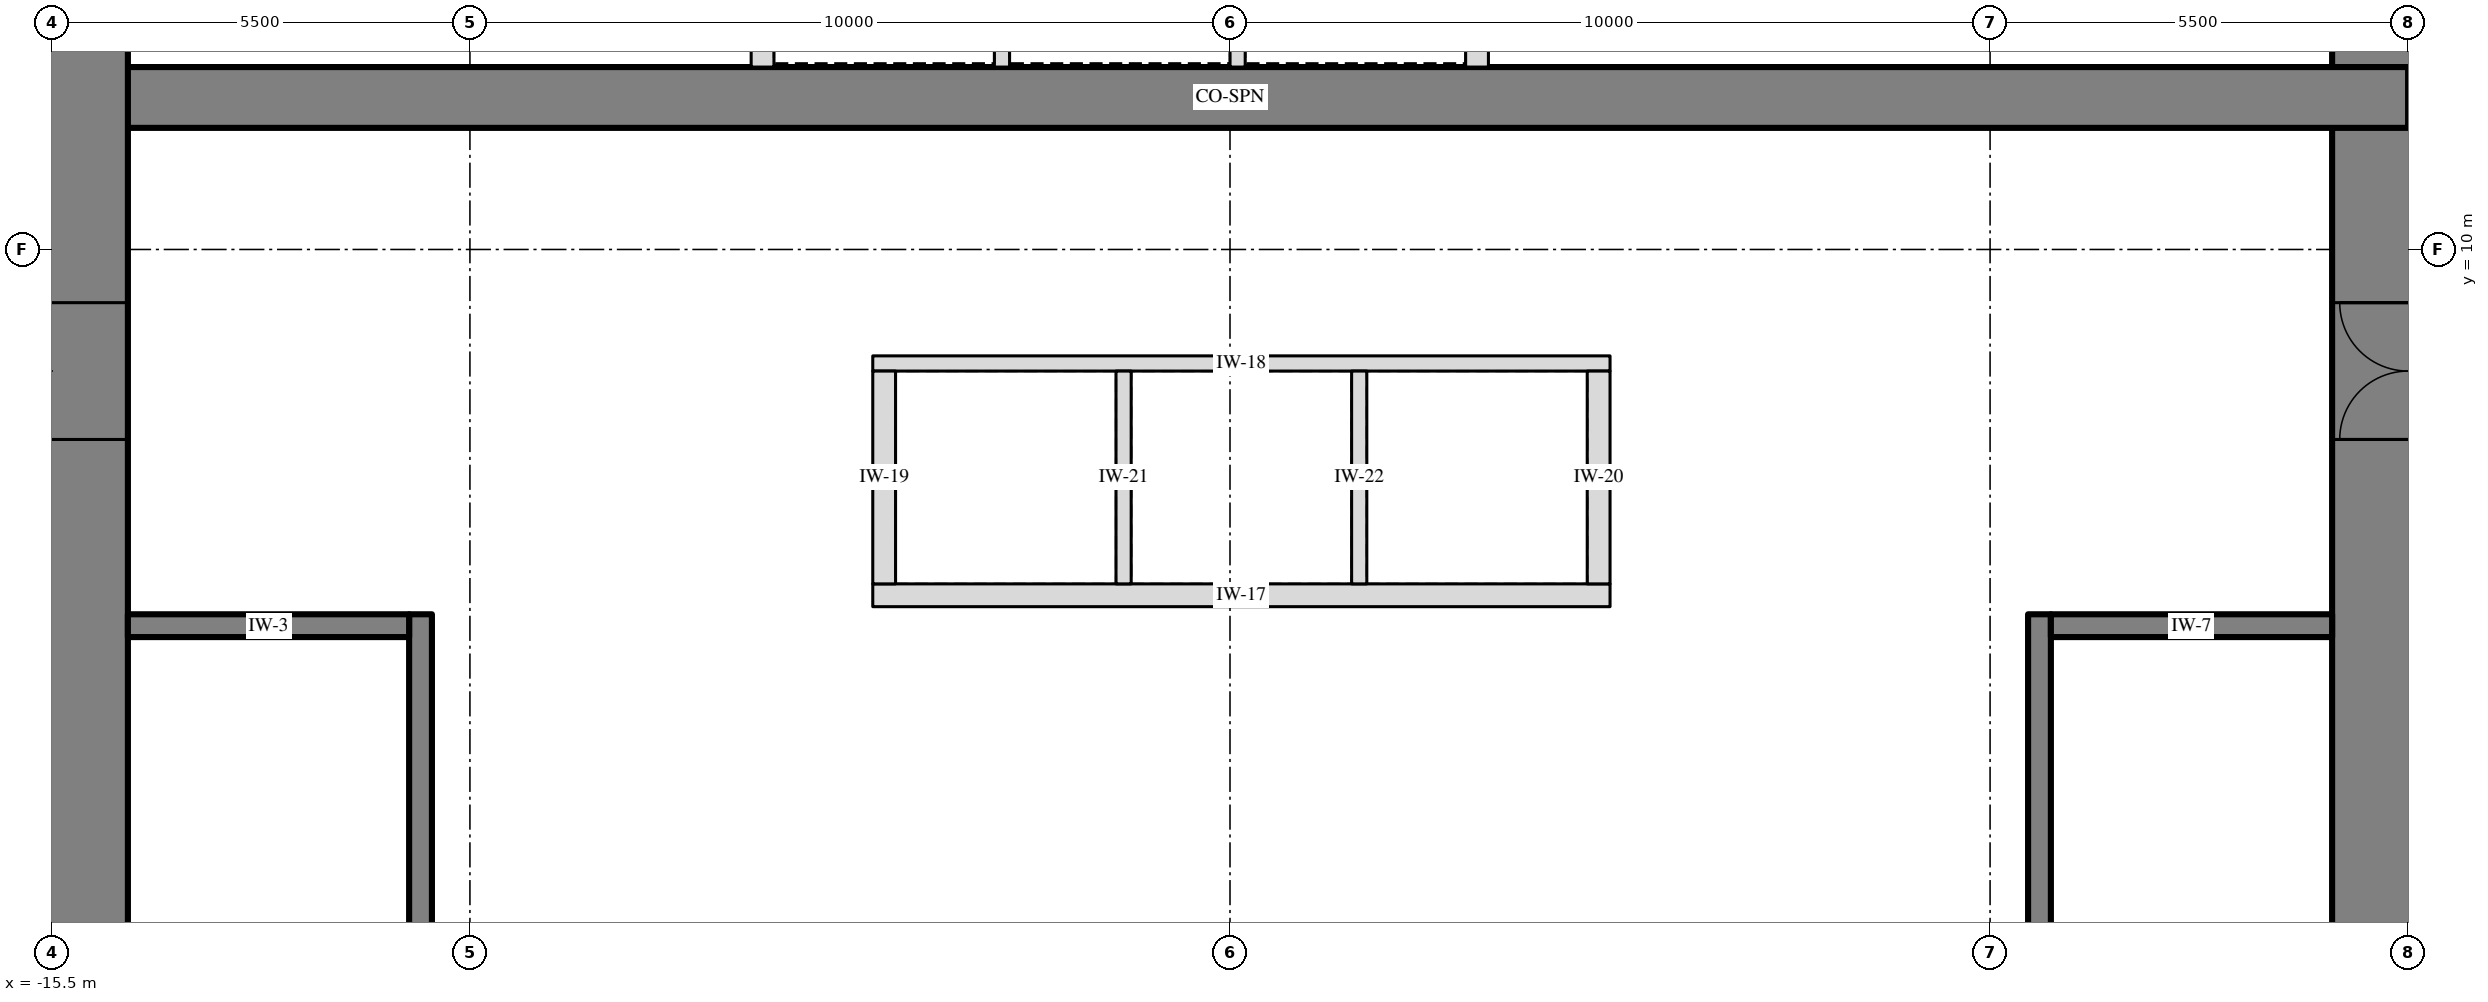
"""IFC4 building model, lengths in metres.
Left out: names, types, materials, properties, quantities, classifications, styles, units other than length and angle.
Written with IfcOpenShell. Run it as: python <this file> out.ifc"""

import sys

from ifc_helpers import new_model, si_unit, direction, frame, frame_2d, origin, place, context, subcontext, project, spatial, rectangle, extrude, element, fill, save


model = new_model("IFC4")
c1 = context("Model", 3, precision=1e-05, world=origin(), true_north=direction((0.0, 1.0)))
c2 = subcontext(c1, "Body", "Model", "MODEL_VIEW")
j1 = project(units=[si_unit("LENGTHUNIT", "METRE"), si_unit("PLANEANGLEUNIT", "RADIAN")], contexts=[c1])
p1 = place(None, origin())
s1 = spatial("IfcSite", under=j1, at=p1, CompositionType="ELEMENT")
p2 = place(p1, origin())
s2 = spatial("IfcBuilding", under=s1, at=p2, CompositionType="ELEMENT")
p3 = place(p2, frame((0.0, 0.0, 21.0)))
s3 = spatial("IfcBuildingStorey", under=s2, at=p3, CompositionType="ELEMENT", Elevation=21.0)
p4 = place(p3, frame((15.5, -15.5, -0.25), z_axis=(0.0, 0.0, 1.0), x_axis=(0.0, 1.0, 0.0)))
e1 = element("IfcWall", 1, at=p4, inside=s3, PredefinedType="SHEAR", context=c2, shape_type="SweptSolid", body=[
    extrude(rectangle(XDim=31.0, YDim=2.0, at=frame_2d((15.5, 0.0))), origin(), (0.0, 0.0, 1.0), 3.75),
])
p5 = place(p4, frame((6.5, 0.0, 0.25)))
e2 = element("IfcOpeningElement", 2, at=p5, cuts=e1, PredefinedType="OPENING", context=c2, shape_type="SweptSolid", body=[
    extrude(rectangle(XDim=1.2, YDim=2.1, at=frame_2d((0.6, 1.05))), frame((0.0, 1.01, 0.0), z_axis=(0.0, -1.0, 0.0), x_axis=(1.0, 0.0, 0.0)), (0.0, 0.0, 1.0), 2.02),
])
p6 = place(p4, frame((23.0, 0.0, 0.25)))
e3 = element("IfcOpeningElement", 3, at=p6, cuts=e1, PredefinedType="OPENING", context=c2, shape_type="SweptSolid", body=[
    extrude(rectangle(XDim=1.8, YDim=2.1, at=frame_2d((0.9, 1.05))), frame((0.0, 1.01, 0.0), z_axis=(0.0, -1.0, 0.0), x_axis=(1.0, 0.0, 0.0)), (0.0, 0.0, 1.0), 2.02),
])
p7 = place(p3, frame((-15.5, 12.0, -0.25), z_axis=(0.0, 0.0, 1.0), x_axis=(1.0, 0.0, 0.0)))
e4 = element("IfcWall", 4, at=p7, inside=s3, PredefinedType="SHEAR", context=c2, shape_type="SweptSolid", body=[
    extrude(rectangle(XDim=31.0, YDim=0.8, at=frame_2d((15.5, 0.0))), origin(), (0.0, 0.0, 1.0), 3.75),
])
p8 = place(p3, frame((-15.5, -15.5, -0.25), z_axis=(0.0, 0.0, 1.0), x_axis=(0.0, 1.0, 0.0)))
e5 = element("IfcWall", 5, at=p8, inside=s3, PredefinedType="SHEAR", context=c2, shape_type="SweptSolid", body=[
    extrude(rectangle(XDim=31.0, YDim=2.0, at=frame_2d((15.5, 0.0))), origin(), (0.0, 0.0, 1.0), 3.75),
])
p9 = place(p8, frame((6.5, 0.0, 0.25)))
e6 = element("IfcOpeningElement", 6, at=p9, cuts=e5, PredefinedType="OPENING", context=c2, shape_type="SweptSolid", body=[
    extrude(rectangle(XDim=1.2, YDim=2.1, at=frame_2d((0.6, 1.05))), frame((0.0, 1.01, 0.0), z_axis=(0.0, -1.0, 0.0), x_axis=(1.0, 0.0, 0.0)), (0.0, 0.0, 1.0), 2.02),
])
p10 = place(p8, frame((23.0, 0.0, 0.25)))
e7 = element("IfcOpeningElement", 7, at=p10, cuts=e5, PredefinedType="OPENING", context=c2, shape_type="SweptSolid", body=[
    extrude(rectangle(XDim=1.8, YDim=2.1, at=frame_2d((0.9, 1.05))), frame((0.0, 1.01, 0.0), z_axis=(0.0, -1.0, 0.0), x_axis=(1.0, 0.0, 0.0)), (0.0, 0.0, 1.0), 2.02),
])
p11 = place(p3, frame((-10.65, -4.9, 0.0), z_axis=(0.0, 0.0, 1.0), x_axis=(0.0, 1.0, 0.0)))
e8 = element("IfcWall", 8, at=p11, inside=s3, PredefinedType="SOLIDWALL", context=c2, shape_type="SweptSolid", body=[
    extrude(rectangle(XDim=10.1, YDim=0.3, at=frame_2d((5.05, 0.0))), origin(), (0.0, 0.0, 1.0), 3.5),
])
p12 = place(p3, frame((-14.5, 5.05, 0.0), z_axis=(0.0, 0.0, 1.0), x_axis=(1.0, 0.0, 0.0)))
e9 = element("IfcWall", 9, at=p12, inside=s3, PredefinedType="SOLIDWALL", context=c2, shape_type="SweptSolid", body=[
    extrude(rectangle(XDim=3.7, YDim=0.3, at=frame_2d((1.85, 0.0))), origin(), (0.0, 0.0, 1.0), 3.5),
])
p13 = place(p3, frame((10.65, -4.9, 0.0), z_axis=(0.0, 0.0, 1.0), x_axis=(0.0, 1.0, 0.0)))
e10 = element("IfcWall", 10, at=p13, inside=s3, PredefinedType="SOLIDWALL", context=c2, shape_type="SweptSolid", body=[
    extrude(rectangle(XDim=10.1, YDim=0.3, at=frame_2d((5.05, 0.0))), origin(), (0.0, 0.0, 1.0), 3.5),
])
p14 = place(p3, frame((14.5, 5.05, 0.0), z_axis=(0.0, 0.0, 1.0), x_axis=(-1.0, 0.0, 0.0)))
e11 = element("IfcWall", 11, at=p14, inside=s3, PredefinedType="SOLIDWALL", context=c2, shape_type="SweptSolid", body=[
    extrude(rectangle(XDim=3.7, YDim=0.3, at=frame_2d((1.85, 0.0))), origin(), (0.0, 0.0, 1.0), 3.5),
])
p15 = place(p3, frame((-4.7, 5.45, 0.0), z_axis=(0.0, 0.0, 1.0), x_axis=(1.0, 0.0, 0.0)))
e12 = element("IfcWall", 12, at=p15, inside=s3, PredefinedType="PARTITIONING", context=c2, shape_type="SweptSolid", body=[
    extrude(rectangle(XDim=9.7, YDim=0.3, at=frame_2d((4.85, 0.0))), origin(), (0.0, 0.0, 1.0), 3.5),
])
p16 = place(p3, frame((-4.7, 8.5, 0.0), z_axis=(0.0, 0.0, 1.0), x_axis=(1.0, 0.0, 0.0)))
e13 = element("IfcWall", 13, at=p16, inside=s3, PredefinedType="PARTITIONING", context=c2, shape_type="SweptSolid", body=[
    extrude(rectangle(XDim=9.7, YDim=0.2, at=frame_2d((4.85, 0.0))), origin(), (0.0, 0.0, 1.0), 3.5),
])
for number, where, z_axis, x_axis in (
    (14, (-4.55, 5.6, 0.0), (0.0, 0.0, 1.0), (0.0, 1.0, 0.0)),
    (15, (4.85, 5.6, 0.0), (0.0, 0.0, 1.0), (0.0, 1.0, 0.0)),
):
    element("IfcWall", number, at=place(p3, frame(where, z_axis=z_axis, x_axis=x_axis)), inside=s3, PredefinedType="PARTITIONING", context=c2, shape_type="SweptSolid", body=[
        extrude(rectangle(XDim=2.8, YDim=0.3, at=frame_2d((1.4, 0.0))), origin(), (0.0, 0.0, 1.0), 3.5),
    ])
for number, where, z_axis, x_axis in (
    (16, (-1.4, 5.6, 0.0), (0.0, 0.0, 1.0), (0.0, 1.0, 0.0)),
    (17, (1.7, 5.6, 0.0), (0.0, 0.0, 1.0), (0.0, 1.0, 0.0)),
):
    element("IfcWall", number, at=place(p3, frame(where, z_axis=z_axis, x_axis=x_axis)), inside=s3, PredefinedType="PARTITIONING", context=c2, shape_type="SweptSolid", body=[
        extrude(rectangle(XDim=2.8, YDim=0.2, at=frame_2d((1.4, 0.0))), origin(), (0.0, 0.0, 1.0), 3.5),
    ])
for number, where, z_axis, x_axis in (
    (18, (-6.15, 12.4, 0.0), (0.0, 0.0, 1.0), (0.0, 1.0, 0.0)),
    (19, (3.25, 12.4, 0.0), (0.0, 0.0, 1.0), (0.0, 1.0, 0.0)),
):
    element("IfcWall", number, at=place(p3, frame(where, z_axis=z_axis, x_axis=x_axis)), inside=s3, PredefinedType="PARTITIONING", context=c2, shape_type="SweptSolid", body=[
        extrude(rectangle(XDim=2.1, YDim=0.3, at=frame_2d((1.05, 0.0))), origin(), (0.0, 0.0, 1.0), 3.5),
    ])
for number, where, z_axis, x_axis in (
    (20, (-3.0, 12.4, 0.0), (0.0, 0.0, 1.0), (0.0, 1.0, 0.0)),
    (21, (0.1, 12.4, 0.0), (0.0, 0.0, 1.0), (0.0, 1.0, 0.0)),
):
    element("IfcWall", number, at=place(p3, frame(where, z_axis=z_axis, x_axis=x_axis)), inside=s3, PredefinedType="PARTITIONING", context=c2, shape_type="SweptSolid", body=[
        extrude(rectangle(XDim=2.1, YDim=0.2, at=frame_2d((1.05, 0.0))), origin(), (0.0, 0.0, 1.0), 3.5),
    ])
p17 = place(p3, frame((-10.65, 2.0, 0.0), z_axis=(0.0, 0.0, 1.0), x_axis=(1.0, 0.0, 0.0)))
e22 = element("IfcWall", 22, at=p17, inside=s3, PredefinedType="PARTITIONING", context=c2, shape_type="SweptSolid", body=[
    extrude(rectangle(XDim=21.3, YDim=0.3, at=frame_2d((10.65, 0.0))), origin(), (0.0, 0.0, 1.0), 3.5),
])
p18 = place(p17, frame((10.05, 0.0, 0.0)))
e23 = element("IfcOpeningElement", 23, at=p18, cuts=e22, PredefinedType="OPENING", context=c2, shape_type="SweptSolid", body=[
    extrude(rectangle(XDim=1.2, YDim=2.1, at=frame_2d((0.6, 1.05))), frame((0.0, 0.16, 0.0), z_axis=(0.0, -1.0, 0.0), x_axis=(1.0, 0.0, 0.0)), (0.0, 0.0, 1.0), 0.32),
])
p19 = place(p17, frame((18.942, 0.0, 0.0)))
e24 = element("IfcOpeningElement", 24, at=p19, cuts=e22, PredefinedType="OPENING", context=c2, shape_type="SweptSolid", body=[
    extrude(rectangle(XDim=0.9, YDim=2.1, at=frame_2d((0.45, 1.05))), frame((0.0, 0.16, 0.0), z_axis=(0.0, -1.0, 0.0), x_axis=(1.0, 0.0, 0.0)), (0.0, 0.0, 1.0), 0.32),
])
p20 = place(p3, frame((-3.3, -6.65, 0.0), z_axis=(0.0, 0.0, 1.0), x_axis=(0.0, 1.0, 0.0)))
e25 = element("IfcWall", 25, at=p20, inside=s3, PredefinedType="PARTITIONING", context=c2, shape_type="SweptSolid", body=[
    extrude(rectangle(XDim=8.65, YDim=0.3, at=frame_2d((4.325, 0.0))), origin(), (0.0, 0.0, 1.0), 3.5),
])
p21 = place(p20, frame((1.75, 0.0, 0.0)))
e26 = element("IfcOpeningElement", 26, at=p21, cuts=e25, PredefinedType="OPENING", context=c2, shape_type="SweptSolid", body=[
    extrude(rectangle(XDim=0.9, YDim=2.1, at=frame_2d((0.45, 1.05))), frame((0.0, 0.16, 0.0), z_axis=(0.0, -1.0, 0.0), x_axis=(1.0, 0.0, 0.0)), (0.0, 0.0, 1.0), 0.32),
])
p22 = place(p20, frame((6.075, 0.0, 0.0)))
e27 = element("IfcOpeningElement", 27, at=p22, cuts=e25, PredefinedType="OPENING", context=c2, shape_type="SweptSolid", body=[
    extrude(rectangle(XDim=0.9, YDim=2.1, at=frame_2d((0.45, 1.05))), frame((0.0, 0.16, 0.0), z_axis=(0.0, -1.0, 0.0), x_axis=(1.0, 0.0, 0.0)), (0.0, 0.0, 1.0), 0.32),
])
p23 = place(p3, frame((3.3, -6.65, 0.0), z_axis=(0.0, 0.0, 1.0), x_axis=(0.0, 1.0, 0.0)))
e28 = element("IfcWall", 28, at=p23, inside=s3, PredefinedType="PARTITIONING", context=c2, shape_type="SweptSolid", body=[
    extrude(rectangle(XDim=8.65, YDim=0.3, at=frame_2d((4.325, 0.0))), origin(), (0.0, 0.0, 1.0), 3.5),
])
p24 = place(p23, frame((3.875, 0.0, 0.0)))
e29 = element("IfcOpeningElement", 29, at=p24, cuts=e28, PredefinedType="OPENING", context=c2, shape_type="SweptSolid", body=[
    extrude(rectangle(XDim=0.9, YDim=2.1, at=frame_2d((0.45, 1.05))), frame((0.0, 0.16, 0.0), z_axis=(0.0, -1.0, 0.0), x_axis=(1.0, 0.0, 0.0)), (0.0, 0.0, 1.0), 0.32),
])
p25 = place(p3, frame((6.834, -6.65, 0.0), z_axis=(0.0, 0.0, 1.0), x_axis=(0.0, 1.0, 0.0)))
e30 = element("IfcWall", 30, at=p25, inside=s3, PredefinedType="PARTITIONING", context=c2, shape_type="SweptSolid", body=[
    extrude(rectangle(XDim=8.65, YDim=0.3, at=frame_2d((4.325, 0.0))), origin(), (0.0, 0.0, 1.0), 3.5),
])
p26 = place(p3, frame((-4.85, 5.3, 0.0), z_axis=(0.0, 0.0, 1.0), x_axis=(0.0, 1.0, 0.0)))
e31 = element("IfcWall", 31, at=p26, inside=s3, PredefinedType="PARTITIONING", context=c2, shape_type="SweptSolid", body=[
    extrude(rectangle(XDim=6.3, YDim=0.3, at=frame_2d((3.15, 0.0))), origin(), (0.0, 0.0, 1.0), 3.5),
])
p27 = place(p26, frame((4.35, 0.0, 0.0)))
e32 = element("IfcOpeningElement", 32, at=p27, cuts=e31, PredefinedType="OPENING", context=c2, shape_type="SweptSolid", body=[
    extrude(rectangle(XDim=0.9, YDim=2.1, at=frame_2d((0.45, 1.05))), frame((0.0, 0.16, 0.0), z_axis=(0.0, -1.0, 0.0), x_axis=(1.0, 0.0, 0.0)), (0.0, 0.0, 1.0), 0.32),
])
p28 = place(p3, frame((5.15, 5.3, 0.0), z_axis=(0.0, 0.0, 1.0), x_axis=(0.0, 1.0, 0.0)))
e33 = element("IfcWall", 33, at=p28, inside=s3, PredefinedType="PARTITIONING", context=c2, shape_type="SweptSolid", body=[
    extrude(rectangle(XDim=6.3, YDim=0.3, at=frame_2d((3.15, 0.0))), origin(), (0.0, 0.0, 1.0), 3.5),
])
p29 = place(p10, origin())
e34 = element("IfcDoor", 34, at=p29, inside=s3, OperationType="DOUBLE_DOOR_SINGLE_SWING", PredefinedType="DOOR", context=c2, shape_type="SweptSolid", body=[
    extrude(rectangle(XDim=1.8, YDim=2.1, at=frame_2d((0.9, 1.05))), frame((0.0, 0.025, 0.0), z_axis=(0.0, -1.0, 0.0), x_axis=(1.0, 0.0, 0.0)), (0.0, 0.0, 1.0), 0.05),
])
fill(e7, e34)
p30 = place(p6, origin())
e35 = element("IfcDoor", 35, at=p30, inside=s3, OperationType="DOUBLE_DOOR_SINGLE_SWING", PredefinedType="DOOR", context=c2, shape_type="SweptSolid", body=[
    extrude(rectangle(XDim=1.8, YDim=2.1, at=frame_2d((0.9, 1.05))), frame((0.0, 0.025, 0.0), z_axis=(0.0, -1.0, 0.0), x_axis=(1.0, 0.0, 0.0)), (0.0, 0.0, 1.0), 0.05),
])
fill(e3, e35)
p31 = place(p18, origin())
e36 = element("IfcDoor", 36, at=p31, inside=s3, OperationType="SINGLE_SWING_LEFT", PredefinedType="DOOR", context=c2, shape_type="SweptSolid", body=[
    extrude(rectangle(XDim=1.2, YDim=2.1, at=frame_2d((0.6, 1.05))), frame((0.0, 0.025, 0.0), z_axis=(0.0, -1.0, 0.0), x_axis=(1.0, 0.0, 0.0)), (0.0, 0.0, 1.0), 0.05),
])
fill(e23, e36)
p32 = place(p19, origin())
e37 = element("IfcDoor", 37, at=p32, inside=s3, OperationType="SINGLE_SWING_RIGHT", PredefinedType="DOOR", context=c2, shape_type="SweptSolid", body=[
    extrude(rectangle(XDim=0.9, YDim=2.1, at=frame_2d((0.45, 1.05))), frame((0.0, 0.025, 0.0), z_axis=(0.0, -1.0, 0.0), x_axis=(1.0, 0.0, 0.0)), (0.0, 0.0, 1.0), 0.05),
])
fill(e24, e37)
p33 = place(p27, origin())
e38 = element("IfcDoor", 38, at=p33, inside=s3, OperationType="SINGLE_SWING_RIGHT", PredefinedType="DOOR", context=c2, shape_type="SweptSolid", body=[
    extrude(rectangle(XDim=0.9, YDim=2.1, at=frame_2d((0.45, 1.05))), frame((0.0, 0.025, 0.0), z_axis=(0.0, -1.0, 0.0), x_axis=(1.0, 0.0, 0.0)), (0.0, 0.0, 1.0), 0.05),
])
fill(e32, e38)
save(model, sys.argv[1])
